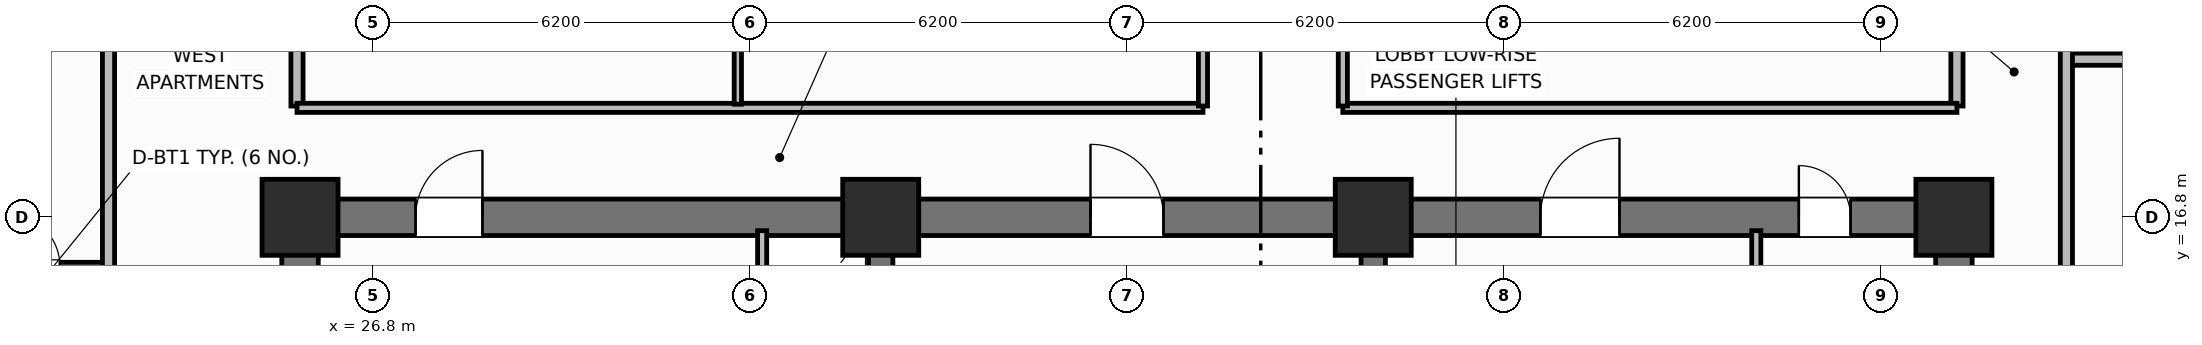
"""IFC4 building model, lengths in metres.
Left out: names, types, materials, properties, quantities, classifications, styles, units other than length and angle.
Written with IfcOpenShell. Run it as: python <this file> out.ifc"""

import sys

from ifc_helpers import new_model, si_unit, direction, frame, frame_2d, origin, origin_2d, place, context, subcontext, project, spatial, rectangle, extrude, element, fill, save


model = new_model("IFC4")
c1 = context("Model", 3, precision=1e-05, world=origin(), true_north=direction((0.0, 1.0)))
c2 = subcontext(c1, "Body", "Model", "MODEL_VIEW")
j1 = project(units=[si_unit("LENGTHUNIT", "METRE"), si_unit("PLANEANGLEUNIT", "RADIAN")], contexts=[c1])
p1 = place(None, origin())
s1 = spatial("IfcSite", under=j1, at=p1, CompositionType="ELEMENT")
p2 = place(p1, origin())
s2 = spatial("IfcBuilding", under=s1, at=p2, CompositionType="ELEMENT")
p3 = place(p2, frame((0.0, 0.0, 65.8)))
s3 = spatial("IfcBuildingStorey", under=s2, at=p3, CompositionType="ELEMENT", Elevation=65.8)
for number, where, z_axis, x_axis in (
    (1, (25.6, 10.9, 0.0), (0.0, 0.0, 1.0), (0.0, 1.0, 0.0)),
    (2, (52.8, 10.9, 0.0), (0.0, 0.0, 1.0), (0.0, 1.0, 0.0)),
):
    element("IfcWall", number, at=place(p3, frame(where, z_axis=z_axis, x_axis=x_axis)), inside=s3, PredefinedType="SHEAR", context=c2, shape_type="SweptSolid", body=[
        extrude(rectangle(XDim=5.6, YDim=0.6, at=frame_2d((2.8, 0.0))), origin(), (0.0, 0.0, 1.0), 3.7),
    ])
p4 = place(p3, frame((25.6, 16.8, 0.0), z_axis=(0.0, 0.0, 1.0), x_axis=(1.0, 0.0, 0.0)))
e3 = element("IfcWall", 3, at=p4, inside=s3, PredefinedType="SHEAR", context=c2, shape_type="SweptSolid", body=[
    extrude(rectangle(XDim=27.2, YDim=0.6, at=frame_2d((13.6, 0.0))), origin(), (0.0, 0.0, 1.0), 3.7),
])
p5 = place(p4, frame((1.9, 0.0, 0.0)))
e4 = element("IfcOpeningElement", 4, at=p5, cuts=e3, PredefinedType="OPENING", context=c2, shape_type="SweptSolid", body=[
    extrude(rectangle(XDim=1.1, YDim=2.15, at=frame_2d((0.55, 1.075))), frame((0.0, 0.31, 0.0), z_axis=(0.0, -1.0, 0.0), x_axis=(1.0, 0.0, 0.0)), (0.0, 0.0, 1.0), 0.62),
])
p6 = place(p4, frame((13.0, 0.0, 0.0)))
e5 = element("IfcOpeningElement", 5, at=p6, cuts=e3, PredefinedType="OPENING", context=c2, shape_type="SweptSolid", body=[
    extrude(rectangle(XDim=1.2, YDim=2.15, at=frame_2d((0.6, 1.075))), frame((0.0, 0.31, 0.0), z_axis=(0.0, -1.0, 0.0), x_axis=(1.0, 0.0, 0.0)), (0.0, 0.0, 1.0), 0.62),
])
p7 = place(p4, frame((20.4, 0.0, 0.0)))
e6 = element("IfcOpeningElement", 6, at=p7, cuts=e3, PredefinedType="OPENING", context=c2, shape_type="SweptSolid", body=[
    extrude(rectangle(XDim=1.3, YDim=2.2, at=frame_2d((0.65, 1.1))), frame((0.0, 0.31, 0.0), z_axis=(0.0, -1.0, 0.0), x_axis=(1.0, 0.0, 0.0)), (0.0, 0.0, 1.0), 0.62),
])
p8 = place(p4, frame((24.65, 0.0, 0.0)))
e7 = element("IfcOpeningElement", 7, at=p8, cuts=e3, PredefinedType="OPENING", context=c2, shape_type="SweptSolid", body=[
    extrude(rectangle(XDim=0.85, YDim=2.1, at=frame_2d((0.425, 1.05))), frame((0.0, 0.31, 0.0), z_axis=(0.0, -1.0, 0.0), x_axis=(1.0, 0.0, 0.0)), (0.0, 0.0, 1.0), 0.62),
])
for number, where, z_axis, x_axis in (
    (8, (35.15, 10.9, 0.0), (0.0, 0.0, 1.0), (0.0, 1.0, 0.0)),
    (9, (43.25, 10.9, 0.0), (0.0, 0.0, 1.0), (0.0, 1.0, 0.0)),
):
    element("IfcWall", number, at=place(p3, frame(where, z_axis=z_axis, x_axis=x_axis)), inside=s3, PredefinedType="SHEAR", context=c2, shape_type="SweptSolid", body=[
        extrude(rectangle(XDim=5.6, YDim=0.4, at=frame_2d((2.8, 0.0))), origin(), (0.0, 0.0, 1.0), 3.7),
    ])
for number, where, z_axis, x_axis in (
    (10, (25.6, 16.8, 0.0), (0.0, 0.0, 1.0), (1.0, 0.0, 0.0)),
    (11, (35.15, 16.8, 0.0), (0.0, 0.0, 1.0), (1.0, 0.0, 0.0)),
    (12, (43.25, 16.8, 0.0), (0.0, 0.0, 1.0), (1.0, 0.0, 0.0)),
    (13, (52.8, 16.8, 0.0), (0.0, 0.0, 1.0), (1.0, 0.0, 0.0)),
):
    element("IfcColumn", number, at=place(p3, frame(where, z_axis=z_axis, x_axis=x_axis)), inside=s3, PredefinedType="COLUMN", context=c2, shape_type="SweptSolid", body=[
        extrude(rectangle(XDim=1.25, YDim=1.25, at=origin_2d()), origin(), (0.0, 0.0, 1.0), 3.7),
    ])
p9 = place(p3, frame((33.2, 14.5, 0.0), z_axis=(0.0, 0.0, 1.0), x_axis=(0.0, 1.0, 0.0)))
e14 = element("IfcWall", 14, at=p9, inside=s3, PredefinedType="PARTITIONING", context=c2, shape_type="SweptSolid", body=[
    extrude(rectangle(XDim=2.08, YDim=0.15, at=frame_2d((1.04, 0.0))), origin(), (0.0, 0.0, 1.0), 2.53),
])
p10 = place(p9, frame((0.55, 0.0, 0.0)))
e15 = element("IfcOpeningElement", 15, at=p10, cuts=e14, PredefinedType="OPENING", context=c2, shape_type="SweptSolid", body=[
    extrude(rectangle(XDim=0.85, YDim=2.05, at=frame_2d((0.425, 1.025))), frame((0.0, 0.085, 0.0), z_axis=(0.0, -1.0, 0.0), x_axis=(1.0, 0.0, 0.0)), (0.0, 0.0, 1.0), 0.17),
])
p11 = place(p3, frame((49.55, 13.7, 0.0), z_axis=(0.0, 0.0, 1.0), x_axis=(0.0, 1.0, 0.0)))
e16 = element("IfcWall", 16, at=p11, inside=s3, PredefinedType="PARTITIONING", context=c2, shape_type="SweptSolid", body=[
    extrude(rectangle(XDim=2.88, YDim=0.15, at=frame_2d((1.44, 0.0))), origin(), (0.0, 0.0, 1.0), 2.53),
])
for number, where, z_axis, x_axis in (
    (17, (25.55, 18.63, 0.0), (0.0, 0.0, 1.0), (0.0, 1.0, 0.0)),
    (18, (52.85, 18.63, 0.0), (0.0, 0.0, 1.0), (0.0, 1.0, 0.0)),
):
    element("IfcWall", number, at=place(p3, frame(where, z_axis=z_axis, x_axis=x_axis)), inside=s3, PredefinedType="PARTITIONING", context=c2, shape_type="SweptSolid", body=[
        extrude(rectangle(XDim=19.14, YDim=0.2, at=frame_2d((9.57, 0.0))), origin(), (0.0, 0.0, 1.0), 2.53),
    ])
p12 = place(p3, frame((25.55, 18.6, 0.0), z_axis=(0.0, 0.0, 1.0), x_axis=(1.0, 0.0, 0.0)))
e19 = element("IfcWall", 19, at=p12, inside=s3, PredefinedType="PARTITIONING", context=c2, shape_type="SweptSolid", body=[
    extrude(rectangle(XDim=14.9, YDim=0.15, at=frame_2d((7.45, 0.0))), origin(), (0.0, 0.0, 1.0), 2.53),
])
p13 = place(p3, frame((42.75, 18.6, 0.0), z_axis=(0.0, 0.0, 1.0), x_axis=(1.0, 0.0, 0.0)))
e20 = element("IfcWall", 20, at=p13, inside=s3, PredefinedType="PARTITIONING", context=c2, shape_type="SweptSolid", body=[
    extrude(rectangle(XDim=10.1, YDim=0.15, at=frame_2d((5.05, 0.0))), origin(), (0.0, 0.0, 1.0), 2.53),
])
p14 = place(p3, frame((32.8, 18.66, 0.0), z_axis=(0.0, 0.0, 1.0), x_axis=(0.0, 1.0, 0.0)))
e21 = element("IfcWall", 21, at=p14, inside=s3, PredefinedType="PARTITIONING", context=c2, shape_type="SweptSolid", body=[
    extrude(rectangle(XDim=9.49, YDim=0.12, at=frame_2d((4.745, 0.0))), origin(), (0.0, 0.0, 1.0), 2.53),
])
p15 = place(p14, frame((2.2, 0.0, 0.0)))
e22 = element("IfcOpeningElement", 22, at=p15, cuts=e21, PredefinedType="OPENING", context=c2, shape_type="SweptSolid", body=[
    extrude(rectangle(XDim=0.9, YDim=2.1, at=frame_2d((0.45, 1.05))), frame((0.0, 0.07, 0.0), z_axis=(0.0, -1.0, 0.0), x_axis=(1.0, 0.0, 0.0)), (0.0, 0.0, 1.0), 0.14),
])
p16 = place(p3, frame((40.45, 18.63, 0.0), z_axis=(0.0, 0.0, 1.0), x_axis=(0.0, 1.0, 0.0)))
e23 = element("IfcWall", 23, at=p16, inside=s3, PredefinedType="PARTITIONING", context=c2, shape_type="SweptSolid", body=[
    extrude(rectangle(XDim=19.14, YDim=0.15, at=frame_2d((9.57, 0.0))), origin(), (0.0, 0.0, 1.0), 2.53),
])
p17 = place(p16, frame((2.4, 0.0, 0.0)))
e24 = element("IfcOpeningElement", 24, at=p17, cuts=e23, PredefinedType="OPENING", context=c2, shape_type="SweptSolid", body=[
    extrude(rectangle(XDim=1.0, YDim=2.15, at=frame_2d((0.5, 1.075))), frame((0.0, 0.085, 0.0), z_axis=(0.0, -1.0, 0.0), x_axis=(1.0, 0.0, 0.0)), (0.0, 0.0, 1.0), 0.17),
])
p18 = place(p16, frame((11.4, 0.0, 0.0)))
e25 = element("IfcOpeningElement", 25, at=p18, cuts=e23, PredefinedType="OPENING", context=c2, shape_type="SweptSolid", body=[
    extrude(rectangle(XDim=1.0, YDim=2.15, at=frame_2d((0.5, 1.075))), frame((0.0, 0.085, 0.0), z_axis=(0.0, -1.0, 0.0), x_axis=(1.0, 0.0, 0.0)), (0.0, 0.0, 1.0), 0.17),
])
p19 = place(p3, frame((42.75, 18.63, 0.0), z_axis=(0.0, 0.0, 1.0), x_axis=(0.0, 1.0, 0.0)))
e26 = element("IfcWall", 26, at=p19, inside=s3, PredefinedType="PARTITIONING", context=c2, shape_type="SweptSolid", body=[
    extrude(rectangle(XDim=19.14, YDim=0.15, at=frame_2d((9.57, 0.0))), origin(), (0.0, 0.0, 1.0), 2.53),
])
p20 = place(p19, frame((5.5, 0.0, 0.0)))
e27 = element("IfcOpeningElement", 27, at=p20, cuts=e26, PredefinedType="OPENING", context=c2, shape_type="SweptSolid", body=[
    extrude(rectangle(XDim=1.0, YDim=2.15, at=frame_2d((0.5, 1.075))), frame((0.0, 0.085, 0.0), z_axis=(0.0, -1.0, 0.0), x_axis=(1.0, 0.0, 0.0)), (0.0, 0.0, 1.0), 0.17),
])
p21 = place(p3, frame((20.2, 16.0, 0.0), z_axis=(0.0, 0.0, 1.0), x_axis=(1.0, 0.0, 0.0)))
e28 = element("IfcWall", 28, at=p21, inside=s3, PredefinedType="PARTITIONING", context=c2, shape_type="SweptSolid", body=[
    extrude(rectangle(XDim=2.25, YDim=0.12, at=frame_2d((1.125, 0.0))), origin(), (0.0, 0.0, 1.0), 2.53),
])
p22 = place(p21, frame((0.6, 0.0, 0.0)))
e29 = element("IfcOpeningElement", 29, at=p22, cuts=e28, PredefinedType="OPENING", context=c2, shape_type="SweptSolid", body=[
    extrude(rectangle(XDim=0.85, YDim=2.1, at=frame_2d((0.425, 1.05))), frame((0.0, 0.07, 0.0), z_axis=(0.0, -1.0, 0.0), x_axis=(1.0, 0.0, 0.0)), (0.0, 0.0, 1.0), 0.14),
])
p23 = place(p3, frame((22.45, 10.6, 0.0), z_axis=(0.0, 0.0, 1.0), x_axis=(0.0, 1.0, 0.0)))
e30 = element("IfcWall", 30, at=p23, inside=s3, PredefinedType="PARTITIONING", context=c2, shape_type="SweptSolid", body=[
    extrude(rectangle(XDim=35.2, YDim=0.2, at=frame_2d((17.6, 0.0))), origin(), (0.0, 0.0, 1.0), 2.53),
])
p24 = place(p23, frame((2.65, 0.0, 0.0)))
e31 = element("IfcOpeningElement", 31, at=p24, cuts=e30, PredefinedType="OPENING", context=c2, shape_type="SweptSolid", body=[
    extrude(rectangle(XDim=1.0, YDim=2.15, at=frame_2d((0.5, 1.075))), frame((0.0, 0.11, 0.0), z_axis=(0.0, -1.0, 0.0), x_axis=(1.0, 0.0, 0.0)), (0.0, 0.0, 1.0), 0.22),
])
p25 = place(p23, frame((19.438, 0.0, 0.0)))
e32 = element("IfcOpeningElement", 32, at=p25, cuts=e30, PredefinedType="OPENING", context=c2, shape_type="SweptSolid", body=[
    extrude(rectangle(XDim=1.0, YDim=2.15, at=frame_2d((0.5, 1.075))), frame((0.0, 0.11, 0.0), z_axis=(0.0, -1.0, 0.0), x_axis=(1.0, 0.0, 0.0)), (0.0, 0.0, 1.0), 0.22),
])
p26 = place(p3, frame((54.65, 19.4, 0.0), z_axis=(0.0, 0.0, 1.0), x_axis=(1.0, 0.0, 0.0)))
e33 = element("IfcWall", 33, at=p26, inside=s3, PredefinedType="PARTITIONING", context=c2, shape_type="SweptSolid", body=[
    extrude(rectangle(XDim=9.18, YDim=0.2, at=frame_2d((4.59, 0.0))), origin(), (0.0, 0.0, 1.0), 2.53),
])
p27 = place(p3, frame((54.65, 10.6, 0.0), z_axis=(0.0, 0.0, 1.0), x_axis=(0.0, 1.0, 0.0)))
e34 = element("IfcWall", 34, at=p27, inside=s3, PredefinedType="PARTITIONING", context=c2, shape_type="SweptSolid", body=[
    extrude(rectangle(XDim=35.2, YDim=0.2, at=frame_2d((17.6, 0.0))), origin(), (0.0, 0.0, 1.0), 2.53),
])
p28 = place(p27, frame((2.65, 0.0, 0.0)))
e35 = element("IfcOpeningElement", 35, at=p28, cuts=e34, PredefinedType="OPENING", context=c2, shape_type="SweptSolid", body=[
    extrude(rectangle(XDim=1.0, YDim=2.15, at=frame_2d((0.5, 1.075))), frame((0.0, 0.11, 0.0), z_axis=(0.0, -1.0, 0.0), x_axis=(1.0, 0.0, 0.0)), (0.0, 0.0, 1.0), 0.22),
])
p29 = place(p27, frame((10.81, 0.0, 0.0)))
e36 = element("IfcOpeningElement", 36, at=p29, cuts=e34, PredefinedType="OPENING", context=c2, shape_type="SweptSolid", body=[
    extrude(rectangle(XDim=1.0, YDim=2.15, at=frame_2d((0.5, 1.075))), frame((0.0, 0.11, 0.0), z_axis=(0.0, -1.0, 0.0), x_axis=(1.0, 0.0, 0.0)), (0.0, 0.0, 1.0), 0.22),
])
p30 = place(p27, frame((19.54, 0.0, 0.0)))
e37 = element("IfcOpeningElement", 37, at=p30, cuts=e34, PredefinedType="OPENING", context=c2, shape_type="SweptSolid", body=[
    extrude(rectangle(XDim=1.0, YDim=2.15, at=frame_2d((0.5, 1.075))), frame((0.0, 0.11, 0.0), z_axis=(0.0, -1.0, 0.0), x_axis=(1.0, 0.0, 0.0)), (0.0, 0.0, 1.0), 0.22),
])
p31 = place(p27, frame((26.95, 0.0, 0.0)))
e38 = element("IfcOpeningElement", 38, at=p31, cuts=e34, PredefinedType="OPENING", context=c2, shape_type="SweptSolid", body=[
    extrude(rectangle(XDim=1.0, YDim=2.15, at=frame_2d((0.5, 1.075))), frame((0.0, 0.11, 0.0), z_axis=(0.0, -1.0, 0.0), x_axis=(1.0, 0.0, 0.0)), (0.0, 0.0, 1.0), 0.22),
])
p32 = place(p22, origin())
e39 = element("IfcDoor", 39, at=p32, inside=s3, OperationType="SINGLE_SWING_LEFT", PredefinedType="DOOR", context=c2, shape_type="SweptSolid", body=[
    extrude(rectangle(XDim=0.85, YDim=2.1, at=frame_2d((0.425, 1.05))), frame((0.0, 0.025, 0.0), z_axis=(0.0, -1.0, 0.0), x_axis=(1.0, 0.0, 0.0)), (0.0, 0.0, 1.0), 0.05),
])
fill(e29, e39)
p33 = place(p5, origin())
e40 = element("IfcDoor", 40, at=p33, inside=s3, OperationType="SINGLE_SWING_RIGHT", PredefinedType="DOOR", context=c2, shape_type="SweptSolid", body=[
    extrude(rectangle(XDim=1.1, YDim=2.15, at=frame_2d((0.55, 1.075))), frame((0.0, 0.025, 0.0), z_axis=(0.0, -1.0, 0.0), x_axis=(1.0, 0.0, 0.0)), (0.0, 0.0, 1.0), 0.05),
])
fill(e4, e40)
p34 = place(p6, origin())
e41 = element("IfcDoor", 41, at=p34, inside=s3, OperationType="SINGLE_SWING_LEFT", PredefinedType="DOOR", context=c2, shape_type="SweptSolid", body=[
    extrude(rectangle(XDim=1.2, YDim=2.15, at=frame_2d((0.6, 1.075))), frame((0.0, 0.025, 0.0), z_axis=(0.0, -1.0, 0.0), x_axis=(1.0, 0.0, 0.0)), (0.0, 0.0, 1.0), 0.05),
])
fill(e5, e41)
p35 = place(p7, origin())
e42 = element("IfcDoor", 42, at=p35, inside=s3, OperationType="SINGLE_SWING_RIGHT", PredefinedType="DOOR", context=c2, shape_type="SweptSolid", body=[
    extrude(rectangle(XDim=1.3, YDim=2.2, at=frame_2d((0.65, 1.1))), frame((0.0, 0.025, 0.0), z_axis=(0.0, -1.0, 0.0), x_axis=(1.0, 0.0, 0.0)), (0.0, 0.0, 1.0), 0.05),
])
fill(e6, e42)
p36 = place(p8, origin())
e43 = element("IfcDoor", 43, at=p36, inside=s3, OperationType="SINGLE_SWING_LEFT", PredefinedType="DOOR", context=c2, shape_type="SweptSolid", body=[
    extrude(rectangle(XDim=0.85, YDim=2.1, at=frame_2d((0.425, 1.05))), frame((0.0, 0.025, 0.0), z_axis=(0.0, -1.0, 0.0), x_axis=(1.0, 0.0, 0.0)), (0.0, 0.0, 1.0), 0.05),
])
fill(e7, e43)
save(model, sys.argv[1])
